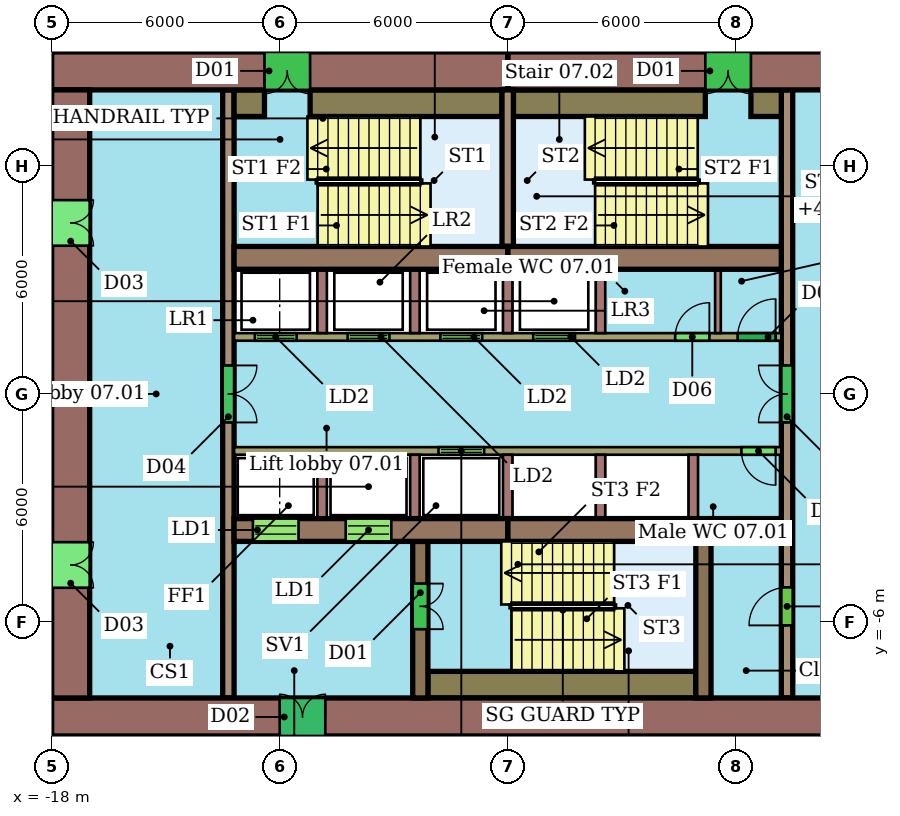
"""IFC4 building model, lengths in metres.
Left out: names, types, materials, properties, quantities, classifications, styles, units other than length and angle.
Written with IfcOpenShell. Run it as: python <this file> out.ifc"""

import sys

from ifc_helpers import new_model, si_unit, direction, frame, frame_2d, origin, place, context, subcontext, project, spatial, rectangle, extrude, element, fill, save


model = new_model("IFC4")
c1 = context("Model", 3, precision=1e-05, world=origin(), true_north=direction((0.0, 1.0)))
c2 = subcontext(c1, "Body", "Model", "MODEL_VIEW")
j1 = project(units=[si_unit("LENGTHUNIT", "METRE"), si_unit("PLANEANGLEUNIT", "RADIAN")], contexts=[c1])
p1 = place(None, origin())
s1 = spatial("IfcSite", under=j1, at=p1, CompositionType="ELEMENT")
p2 = place(p1, origin())
s2 = spatial("IfcBuilding", under=s1, at=p2, CompositionType="ELEMENT")
p3 = place(p2, frame((0.0, 0.0, 43.4)))
s3 = spatial("IfcBuildingStorey", under=s2, at=p3, CompositionType="ELEMENT", Elevation=43.4)
p4 = place(p3, frame((6.0, 8.5, 0.0), z_axis=(0.0, 0.0, 1.0), x_axis=(-1.0, 0.0, 0.0)))
e1 = element("IfcWall", 1, at=p4, inside=s3, PredefinedType="SHEAR", context=c2, shape_type="SweptSolid", body=[
    extrude(rectangle(XDim=12.0, YDim=1.0, at=frame_2d((6.0, 0.0))), origin(), (0.0, 0.0, 1.0), 3.4),
])
p5 = place(p4, frame((5.6, 0.0, 0.0)))
e2 = element("IfcOpeningElement", 2, at=p5, cuts=e1, PredefinedType="OPENING", context=c2, shape_type="SweptSolid", body=[
    extrude(rectangle(XDim=1.2, YDim=2.1, at=frame_2d((0.6, 1.05))), frame((0.0, 0.51, 0.0), z_axis=(0.0, -1.0, 0.0), x_axis=(1.0, 0.0, 0.0)), (0.0, 0.0, 1.0), 1.02),
])
p6 = place(p3, frame((-6.0, 8.5, 0.0), z_axis=(0.0, 0.0, 1.0), x_axis=(-1.0, 0.0, 0.0)))
e3 = element("IfcWall", 3, at=p6, inside=s3, PredefinedType="SHEAR", context=c2, shape_type="SweptSolid", body=[
    extrude(rectangle(XDim=12.0, YDim=1.0, at=frame_2d((6.0, 0.0))), origin(), (0.0, 0.0, 1.0), 3.4),
])
p7 = place(p6, frame((5.2, 0.0, 0.0)))
e4 = element("IfcOpeningElement", 4, at=p7, cuts=e3, PredefinedType="OPENING", context=c2, shape_type="SweptSolid", body=[
    extrude(rectangle(XDim=1.2, YDim=2.1, at=frame_2d((0.6, 1.05))), frame((0.0, 0.51, 0.0), z_axis=(0.0, -1.0, 0.0), x_axis=(1.0, 0.0, 0.0)), (0.0, 0.0, 1.0), 1.02),
])
p8 = place(p3, frame((-18.0, -8.5, 0.0), z_axis=(0.0, 0.0, 1.0), x_axis=(1.0, 0.0, 0.0)))
e5 = element("IfcWall", 5, at=p8, inside=s3, PredefinedType="SHEAR", context=c2, shape_type="SweptSolid", body=[
    extrude(rectangle(XDim=24.0, YDim=1.0, at=frame_2d((12.0, 0.0))), origin(), (0.0, 0.0, 1.0), 3.4),
])
p9 = place(p8, frame((6.0, 0.0, 0.0)))
e6 = element("IfcOpeningElement", 6, at=p9, cuts=e5, PredefinedType="OPENING", context=c2, shape_type="SweptSolid", body=[
    extrude(rectangle(XDim=1.2, YDim=2.1, at=frame_2d((0.6, 1.05))), frame((0.0, 0.51, 0.0), z_axis=(0.0, -1.0, 0.0), x_axis=(1.0, 0.0, 0.0)), (0.0, 0.0, 1.0), 1.02),
])
p10 = place(p3, frame((-17.5, 8.0, 0.0), z_axis=(0.0, 0.0, 1.0), x_axis=(0.0, -1.0, 0.0)))
e7 = element("IfcWall", 7, at=p10, inside=s3, PredefinedType="SHEAR", context=c2, shape_type="SweptSolid", body=[
    extrude(rectangle(XDim=16.0, YDim=1.0, at=frame_2d((8.0, 0.0))), origin(), (0.0, 0.0, 1.0), 3.4),
])
p11 = place(p10, frame((11.9, 0.0, 0.0)))
e8 = element("IfcOpeningElement", 8, at=p11, cuts=e7, PredefinedType="OPENING", context=c2, shape_type="SweptSolid", body=[
    extrude(rectangle(XDim=1.2, YDim=2.1, at=frame_2d((0.6, 1.05))), frame((0.0, 0.51, 0.0), z_axis=(0.0, -1.0, 0.0), x_axis=(1.0, 0.0, 0.0)), (0.0, 0.0, 1.0), 1.02),
])
p12 = place(p10, frame((2.9, 0.0, 0.0)))
e9 = element("IfcOpeningElement", 9, at=p12, cuts=e7, PredefinedType="OPENING", context=c2, shape_type="SweptSolid", body=[
    extrude(rectangle(XDim=1.2, YDim=2.1, at=frame_2d((0.6, 1.05))), frame((0.0, 0.51, 0.0), z_axis=(0.0, -1.0, 0.0), x_axis=(1.0, 0.0, 0.0)), (0.0, 0.0, 1.0), 1.02),
])
for number, where, z_axis, x_axis in (
    (10, (-13.2, 3.58, 0.0), (0.0, 0.0, 1.0), (1.0, 0.0, 0.0)),
    (11, (-6.0, 3.58, 0.0), (0.0, 0.0, 1.0), (1.0, 0.0, 0.0)),
):
    element("IfcWall", number, at=place(p3, frame(where, z_axis=z_axis, x_axis=x_axis)), inside=s3, PredefinedType="SHEAR", context=c2, shape_type="SweptSolid", body=[
        extrude(rectangle(XDim=7.2, YDim=0.6, at=frame_2d((3.6, 0.0))), origin(), (0.0, 0.0, 1.0), 3.4),
    ])
p13 = place(p3, frame((-13.2, -3.58, 0.0), z_axis=(0.0, 0.0, 1.0), x_axis=(1.0, 0.0, 0.0)))
e12 = element("IfcWall", 12, at=p13, inside=s3, PredefinedType="SHEAR", context=c2, shape_type="SweptSolid", body=[
    extrude(rectangle(XDim=7.2, YDim=0.6, at=frame_2d((3.6, 0.0))), origin(), (0.0, 0.0, 1.0), 3.4),
])
p14 = place(p13, frame((0.496, 0.0, 0.0)))
e13 = element("IfcOpeningElement", 13, at=p14, cuts=e12, PredefinedType="OPENING", context=c2, shape_type="SweptSolid", body=[
    extrude(rectangle(XDim=1.2, YDim=2.1, at=frame_2d((0.6, 1.05))), frame((0.0, 0.31, 0.0), z_axis=(0.0, -1.0, 0.0), x_axis=(1.0, 0.0, 0.0)), (0.0, 0.0, 1.0), 0.62),
])
p15 = place(p13, frame((2.938, 0.0, 0.0)))
e14 = element("IfcOpeningElement", 14, at=p15, cuts=e12, PredefinedType="OPENING", context=c2, shape_type="SweptSolid", body=[
    extrude(rectangle(XDim=1.2, YDim=2.1, at=frame_2d((0.6, 1.05))), frame((0.0, 0.31, 0.0), z_axis=(0.0, -1.0, 0.0), x_axis=(1.0, 0.0, 0.0)), (0.0, 0.0, 1.0), 0.62),
])
p16 = place(p3, frame((-6.0, -3.58, 0.0), z_axis=(0.0, 0.0, 1.0), x_axis=(1.0, 0.0, 0.0)))
e15 = element("IfcWall", 15, at=p16, inside=s3, PredefinedType="SHEAR", context=c2, shape_type="SweptSolid", body=[
    extrude(rectangle(XDim=7.2, YDim=0.6, at=frame_2d((3.6, 0.0))), origin(), (0.0, 0.0, 1.0), 3.4),
])
p17 = place(p3, frame((-13.35, 8.0, 0.0), z_axis=(0.0, 0.0, 1.0), x_axis=(0.0, -1.0, 0.0)))
e16 = element("IfcWall", 16, at=p17, inside=s3, PredefinedType="SHEAR", context=c2, shape_type="SweptSolid", body=[
    extrude(rectangle(XDim=16.0, YDim=0.3, at=frame_2d((8.0, 0.0))), origin(), (0.0, 0.0, 1.0), 3.4),
])
p18 = place(p17, frame((7.25, 0.0, 0.0)))
e17 = element("IfcOpeningElement", 17, at=p18, cuts=e16, PredefinedType="OPENING", context=c2, shape_type="SweptSolid", body=[
    extrude(rectangle(XDim=1.5, YDim=2.1, at=frame_2d((0.75, 1.05))), frame((0.0, 0.16, 0.0), z_axis=(0.0, -1.0, 0.0), x_axis=(1.0, 0.0, 0.0)), (0.0, 0.0, 1.0), 0.32),
])
p19 = place(p3, frame((1.35, -8.0, 0.0), z_axis=(0.0, 0.0, 1.0), x_axis=(0.0, 1.0, 0.0)))
e18 = element("IfcWall", 18, at=p19, inside=s3, PredefinedType="SHEAR", context=c2, shape_type="SweptSolid", body=[
    extrude(rectangle(XDim=16.0, YDim=0.3, at=frame_2d((8.0, 0.0))), origin(), (0.0, 0.0, 1.0), 3.4),
])
p20 = place(p19, frame((1.91, 0.0, 0.0)))
e19 = element("IfcOpeningElement", 19, at=p20, cuts=e18, PredefinedType="OPENING", context=c2, shape_type="SweptSolid", body=[
    extrude(rectangle(XDim=1.0, YDim=2.1, at=frame_2d((0.5, 1.05))), frame((0.0, 0.16, 0.0), z_axis=(0.0, -1.0, 0.0), x_axis=(1.0, 0.0, 0.0)), (0.0, 0.0, 1.0), 0.32),
])
p21 = place(p19, frame((7.25, 0.0, 0.0)))
e20 = element("IfcOpeningElement", 20, at=p21, cuts=e18, PredefinedType="OPENING", context=c2, shape_type="SweptSolid", body=[
    extrude(rectangle(XDim=1.5, YDim=2.1, at=frame_2d((0.75, 1.05))), frame((0.0, 0.16, 0.0), z_axis=(0.0, -1.0, 0.0), x_axis=(1.0, 0.0, 0.0)), (0.0, 0.0, 1.0), 0.32),
])
p22 = place(p3, frame((-13.2, 1.5, 0.0), z_axis=(0.0, 0.0, 1.0), x_axis=(1.0, 0.0, 0.0)))
e21 = element("IfcWall", 21, at=p22, inside=s3, PredefinedType="SHEAR", context=c2, shape_type="SweptSolid", body=[
    extrude(rectangle(XDim=14.4, YDim=0.2, at=frame_2d((7.2, 0.0))), origin(), (0.0, 0.0, 1.0), 3.4),
])
p23 = place(p22, frame((0.546, 0.0, 0.0)))
e22 = element("IfcOpeningElement", 22, at=p23, cuts=e21, PredefinedType="OPENING", context=c2, shape_type="SweptSolid", body=[
    extrude(rectangle(XDim=1.1, YDim=2.1, at=frame_2d((0.55, 1.05))), frame((0.0, 0.11, 0.0), z_axis=(0.0, -1.0, 0.0), x_axis=(1.0, 0.0, 0.0)), (0.0, 0.0, 1.0), 0.22),
])
p24 = place(p22, frame((2.988, 0.0, 0.0)))
e23 = element("IfcOpeningElement", 23, at=p24, cuts=e21, PredefinedType="OPENING", context=c2, shape_type="SweptSolid", body=[
    extrude(rectangle(XDim=1.1, YDim=2.1, at=frame_2d((0.55, 1.05))), frame((0.0, 0.11, 0.0), z_axis=(0.0, -1.0, 0.0), x_axis=(1.0, 0.0, 0.0)), (0.0, 0.0, 1.0), 0.22),
])
p25 = place(p22, frame((5.429, 0.0, 0.0)))
e24 = element("IfcOpeningElement", 24, at=p25, cuts=e21, PredefinedType="OPENING", context=c2, shape_type="SweptSolid", body=[
    extrude(rectangle(XDim=1.1, YDim=2.1, at=frame_2d((0.55, 1.05))), frame((0.0, 0.11, 0.0), z_axis=(0.0, -1.0, 0.0), x_axis=(1.0, 0.0, 0.0)), (0.0, 0.0, 1.0), 0.22),
])
p26 = place(p22, frame((7.871, 0.0, 0.0)))
e25 = element("IfcOpeningElement", 25, at=p26, cuts=e21, PredefinedType="OPENING", context=c2, shape_type="SweptSolid", body=[
    extrude(rectangle(XDim=1.1, YDim=2.1, at=frame_2d((0.55, 1.05))), frame((0.0, 0.11, 0.0), z_axis=(0.0, -1.0, 0.0), x_axis=(1.0, 0.0, 0.0)), (0.0, 0.0, 1.0), 0.22),
])
p27 = place(p22, frame((11.607, 0.0, 0.0)))
e26 = element("IfcOpeningElement", 26, at=p27, cuts=e21, PredefinedType="OPENING", context=c2, shape_type="SweptSolid", body=[
    extrude(rectangle(XDim=0.9, YDim=2.1, at=frame_2d((0.45, 1.05))), frame((0.0, 0.11, 0.0), z_axis=(0.0, -1.0, 0.0), x_axis=(1.0, 0.0, 0.0)), (0.0, 0.0, 1.0), 0.22),
])
p28 = place(p22, frame((13.25, 0.0, 0.0)))
e27 = element("IfcOpeningElement", 27, at=p28, cuts=e21, PredefinedType="OPENING", context=c2, shape_type="SweptSolid", body=[
    extrude(rectangle(XDim=1.0, YDim=2.1, at=frame_2d((0.5, 1.05))), frame((0.0, 0.11, 0.0), z_axis=(0.0, -1.0, 0.0), x_axis=(1.0, 0.0, 0.0)), (0.0, 0.0, 1.0), 0.22),
])
p29 = place(p3, frame((1.2, -1.5, 0.0), z_axis=(0.0, 0.0, 1.0), x_axis=(-1.0, 0.0, 0.0)))
e28 = element("IfcWall", 28, at=p29, inside=s3, PredefinedType="SHEAR", context=c2, shape_type="SweptSolid", body=[
    extrude(rectangle(XDim=14.4, YDim=0.2, at=frame_2d((7.2, 0.0))), origin(), (0.0, 0.0, 1.0), 3.4),
])
p30 = place(p29, frame((7.821, 0.0, 0.0)))
e29 = element("IfcOpeningElement", 29, at=p30, cuts=e28, PredefinedType="OPENING", context=c2, shape_type="SweptSolid", body=[
    extrude(rectangle(XDim=1.2, YDim=2.1, at=frame_2d((0.6, 1.05))), frame((0.0, 0.11, 0.0), z_axis=(0.0, -1.0, 0.0), x_axis=(1.0, 0.0, 0.0)), (0.0, 0.0, 1.0), 0.22),
])
p31 = place(p29, frame((0.15, 0.0, 0.0)))
e30 = element("IfcOpeningElement", 30, at=p31, cuts=e28, PredefinedType="OPENING", context=c2, shape_type="SweptSolid", body=[
    extrude(rectangle(XDim=0.9, YDim=2.1, at=frame_2d((0.45, 1.05))), frame((0.0, 0.11, 0.0), z_axis=(0.0, -1.0, 0.0), x_axis=(1.0, 0.0, 0.0)), (0.0, 0.0, 1.0), 0.22),
])
p32 = place(p3, frame((-8.3, -3.88, 0.0), z_axis=(0.0, 0.0, 1.0), x_axis=(0.0, -1.0, 0.0)))
e31 = element("IfcWall", 31, at=p32, inside=s3, PredefinedType="SHEAR", context=c2, shape_type="SweptSolid", body=[
    extrude(rectangle(XDim=4.12, YDim=0.4, at=frame_2d((2.06, 0.0))), origin(), (0.0, 0.0, 1.0), 3.4),
])
p33 = place(p32, frame((1.11, 0.0, 0.0)))
e32 = element("IfcOpeningElement", 32, at=p33, cuts=e31, PredefinedType="OPENING", context=c2, shape_type="SweptSolid", body=[
    extrude(rectangle(XDim=1.2, YDim=2.1, at=frame_2d((0.6, 1.05))), frame((0.0, 0.21, 0.0), z_axis=(0.0, -1.0, 0.0), x_axis=(1.0, 0.0, 0.0)), (0.0, 0.0, 1.0), 0.42),
])
p34 = place(p3, frame((-0.85, -3.88, 0.0), z_axis=(0.0, 0.0, 1.0), x_axis=(0.0, -1.0, 0.0)))
e33 = element("IfcWall", 33, at=p34, inside=s3, PredefinedType="SHEAR", context=c2, shape_type="SweptSolid", body=[
    extrude(rectangle(XDim=4.12, YDim=0.4, at=frame_2d((2.06, 0.0))), origin(), (0.0, 0.0, 1.0), 3.4),
])
p35 = place(p3, frame((-6.0, 3.88, 0.0), z_axis=(0.0, 0.0, 1.0), x_axis=(0.0, 1.0, 0.0)))
e34 = element("IfcWall", 34, at=p35, inside=s3, PredefinedType="SHEAR", context=c2, shape_type="SweptSolid", body=[
    extrude(rectangle(XDim=4.12, YDim=0.3, at=frame_2d((2.06, 0.0))), origin(), (0.0, 0.0, 1.0), 3.4),
])
p36 = place(p3, frame((-13.2, 7.65, 0.0), z_axis=(0.0, 0.0, 1.0), x_axis=(1.0, 0.0, 0.0)))
e35 = element("IfcWall", 35, at=p36, inside=s3, PredefinedType="SHEAR", context=c2, shape_type="SweptSolid", body=[
    extrude(rectangle(XDim=0.8, YDim=0.7, at=frame_2d((0.4, 0.0))), origin(), (0.0, 0.0, 1.0), 3.4),
])
for number, where, z_axis, x_axis in (
    (36, (-11.2, 7.65, 0.0), (0.0, 0.0, 1.0), (1.0, 0.0, 0.0)),
    (37, (-5.85, 7.65, 0.0), (0.0, 0.0, 1.0), (1.0, 0.0, 0.0)),
):
    element("IfcWall", number, at=place(p3, frame(where, z_axis=z_axis, x_axis=x_axis)), inside=s3, PredefinedType="SHEAR", context=c2, shape_type="SweptSolid", body=[
        extrude(rectangle(XDim=5.05, YDim=0.7, at=frame_2d((2.525, 0.0))), origin(), (0.0, 0.0, 1.0), 3.4),
    ])
p37 = place(p3, frame((0.4, 7.65, 0.0), z_axis=(0.0, 0.0, 1.0), x_axis=(1.0, 0.0, 0.0)))
e38 = element("IfcWall", 38, at=p37, inside=s3, PredefinedType="SHEAR", context=c2, shape_type="SweptSolid", body=[
    extrude(rectangle(XDim=0.8, YDim=0.7, at=frame_2d((0.4, 0.0))), origin(), (0.0, 0.0, 1.0), 3.4),
])
p38 = place(p3, frame((-8.1, -7.65, 0.0), z_axis=(0.0, 0.0, 1.0), x_axis=(1.0, 0.0, 0.0)))
e39 = element("IfcWall", 39, at=p38, inside=s3, PredefinedType="SHEAR", context=c2, shape_type="SweptSolid", body=[
    extrude(rectangle(XDim=7.05, YDim=0.7, at=frame_2d((3.525, 0.0))), origin(), (0.0, 0.0, 1.0), 3.4),
])
for number, where, z_axis, x_axis in (
    (40, (-10.883, 1.6, 0.0), (0.0, 0.0, 1.0), (0.0, 1.0, 0.0)),
    (41, (-8.442, 1.6, 0.0), (0.0, 0.0, 1.0), (0.0, 1.0, 0.0)),
    (42, (-6.0, 1.6, 0.0), (0.0, 0.0, 1.0), (0.0, 1.0, 0.0)),
    (43, (-3.558, 1.6, 0.0), (0.0, 0.0, 1.0), (0.0, 1.0, 0.0)),
):
    element("IfcWall", number, at=place(p3, frame(where, z_axis=z_axis, x_axis=x_axis)), inside=s3, PredefinedType="SHEAR", context=c2, shape_type="SweptSolid", body=[
        extrude(rectangle(XDim=1.68, YDim=0.25, at=frame_2d((0.84, 0.0))), origin(), (0.0, 0.0, 1.0), 3.4),
    ])
p39 = place(p3, frame((-0.468, 1.6, 0.0), z_axis=(0.0, 0.0, 1.0), x_axis=(0.0, 1.0, 0.0)))
e44 = element("IfcWall", 44, at=p39, inside=s3, PredefinedType="PARTITIONING", context=c2, shape_type="SweptSolid", body=[
    extrude(rectangle(XDim=1.68, YDim=0.15, at=frame_2d((0.84, 0.0))), origin(), (0.0, 0.0, 1.0), 3.4),
])
for number, where, z_axis, x_axis in (
    (45, (-10.883, -1.6, 0.0), (0.0, 0.0, 1.0), (0.0, -1.0, 0.0)),
    (46, (-8.442, -1.6, 0.0), (0.0, 0.0, 1.0), (0.0, -1.0, 0.0)),
    (47, (-6.0, -1.6, 0.0), (0.0, 0.0, 1.0), (0.0, -1.0, 0.0)),
    (48, (-3.558, -1.6, 0.0), (0.0, 0.0, 1.0), (0.0, -1.0, 0.0)),
    (49, (-1.117, -1.6, 0.0), (0.0, 0.0, 1.0), (0.0, -1.0, 0.0)),
):
    element("IfcWall", number, at=place(p3, frame(where, z_axis=z_axis, x_axis=x_axis)), inside=s3, PredefinedType="SHEAR", context=c2, shape_type="SweptSolid", body=[
        extrude(rectangle(XDim=1.68, YDim=0.25, at=frame_2d((0.84, 0.0))), origin(), (0.0, 0.0, 1.0), 3.4),
    ])
p40 = place(p5, origin())
e50 = element("IfcDoor", 50, at=p40, inside=s3, OperationType="DOUBLE_DOOR_SINGLE_SWING", PredefinedType="NOTDEFINED", context=c2, shape_type="SweptSolid", body=[
    extrude(rectangle(XDim=1.2, YDim=2.1, at=frame_2d((0.6, 1.05))), frame((0.0, 0.025, 0.0), z_axis=(0.0, -1.0, 0.0), x_axis=(1.0, 0.0, 0.0)), (0.0, 0.0, 1.0), 0.05),
])
fill(e2, e50)
p41 = place(p7, origin())
e51 = element("IfcDoor", 51, at=p41, inside=s3, OperationType="DOUBLE_DOOR_SINGLE_SWING", PredefinedType="NOTDEFINED", context=c2, shape_type="SweptSolid", body=[
    extrude(rectangle(XDim=1.2, YDim=2.1, at=frame_2d((0.6, 1.05))), frame((0.0, 0.025, 0.0), z_axis=(0.0, -1.0, 0.0), x_axis=(1.0, 0.0, 0.0)), (0.0, 0.0, 1.0), 0.05),
])
fill(e4, e51)
p42 = place(p9, origin())
e52 = element("IfcDoor", 52, at=p42, inside=s3, OperationType="DOUBLE_DOOR_SINGLE_SWING", PredefinedType="NOTDEFINED", context=c2, shape_type="SweptSolid", body=[
    extrude(rectangle(XDim=1.2, YDim=2.1, at=frame_2d((0.6, 1.05))), frame((0.0, 0.025, 0.0), z_axis=(0.0, -1.0, 0.0), x_axis=(1.0, 0.0, 0.0)), (0.0, 0.0, 1.0), 0.05),
])
fill(e6, e52)
p43 = place(p11, origin())
e53 = element("IfcDoor", 53, at=p43, inside=s3, OperationType="DOUBLE_DOOR_SINGLE_SWING", PredefinedType="NOTDEFINED", context=c2, shape_type="SweptSolid", body=[
    extrude(rectangle(XDim=1.2, YDim=2.1, at=frame_2d((0.6, 1.05))), frame((0.0, 0.025, 0.0), z_axis=(0.0, -1.0, 0.0), x_axis=(1.0, 0.0, 0.0)), (0.0, 0.0, 1.0), 0.05),
])
fill(e8, e53)
p44 = place(p12, origin())
e54 = element("IfcDoor", 54, at=p44, inside=s3, OperationType="DOUBLE_DOOR_SINGLE_SWING", PredefinedType="NOTDEFINED", context=c2, shape_type="SweptSolid", body=[
    extrude(rectangle(XDim=1.2, YDim=2.1, at=frame_2d((0.6, 1.05))), frame((0.0, 0.025, 0.0), z_axis=(0.0, -1.0, 0.0), x_axis=(1.0, 0.0, 0.0)), (0.0, 0.0, 1.0), 0.05),
])
fill(e9, e54)
p45 = place(p14, origin())
e55 = element("IfcDoor", 55, at=p45, inside=s3, OperationType="DOUBLE_DOOR_SLIDING", PredefinedType="NOTDEFINED", context=c2, shape_type="SweptSolid", body=[
    extrude(rectangle(XDim=1.2, YDim=2.1, at=frame_2d((0.6, 1.05))), frame((0.0, 0.025, 0.0), z_axis=(0.0, -1.0, 0.0), x_axis=(1.0, 0.0, 0.0)), (0.0, 0.0, 1.0), 0.05),
])
fill(e13, e55)
p46 = place(p15, origin())
e56 = element("IfcDoor", 56, at=p46, inside=s3, OperationType="DOUBLE_DOOR_SLIDING", PredefinedType="NOTDEFINED", context=c2, shape_type="SweptSolid", body=[
    extrude(rectangle(XDim=1.2, YDim=2.1, at=frame_2d((0.6, 1.05))), frame((0.0, 0.025, 0.0), z_axis=(0.0, -1.0, 0.0), x_axis=(1.0, 0.0, 0.0)), (0.0, 0.0, 1.0), 0.05),
])
fill(e14, e56)
p47 = place(p18, origin())
e57 = element("IfcDoor", 57, at=p47, inside=s3, OperationType="DOUBLE_DOOR_SINGLE_SWING", PredefinedType="NOTDEFINED", context=c2, shape_type="SweptSolid", body=[
    extrude(rectangle(XDim=1.5, YDim=2.1, at=frame_2d((0.75, 1.05))), frame((0.0, 0.025, 0.0), z_axis=(0.0, -1.0, 0.0), x_axis=(1.0, 0.0, 0.0)), (0.0, 0.0, 1.0), 0.05),
])
fill(e17, e57)
p48 = place(p20, origin())
e58 = element("IfcDoor", 58, at=p48, inside=s3, OperationType="SINGLE_SWING_LEFT", PredefinedType="NOTDEFINED", context=c2, shape_type="SweptSolid", body=[
    extrude(rectangle(XDim=1.0, YDim=2.1, at=frame_2d((0.5, 1.05))), frame((0.0, 0.025, 0.0), z_axis=(0.0, -1.0, 0.0), x_axis=(1.0, 0.0, 0.0)), (0.0, 0.0, 1.0), 0.05),
])
fill(e19, e58)
p49 = place(p21, origin())
e59 = element("IfcDoor", 59, at=p49, inside=s3, OperationType="DOUBLE_DOOR_SINGLE_SWING", PredefinedType="NOTDEFINED", context=c2, shape_type="SweptSolid", body=[
    extrude(rectangle(XDim=1.5, YDim=2.1, at=frame_2d((0.75, 1.05))), frame((0.0, 0.025, 0.0), z_axis=(0.0, -1.0, 0.0), x_axis=(1.0, 0.0, 0.0)), (0.0, 0.0, 1.0), 0.05),
])
fill(e20, e59)
p50 = place(p23, origin())
e60 = element("IfcDoor", 60, at=p50, inside=s3, OperationType="DOUBLE_DOOR_SLIDING", PredefinedType="NOTDEFINED", context=c2, shape_type="SweptSolid", body=[
    extrude(rectangle(XDim=1.1, YDim=2.1, at=frame_2d((0.55, 1.05))), frame((0.0, 0.025, 0.0), z_axis=(0.0, -1.0, 0.0), x_axis=(1.0, 0.0, 0.0)), (0.0, 0.0, 1.0), 0.05),
])
fill(e22, e60)
p51 = place(p24, origin())
e61 = element("IfcDoor", 61, at=p51, inside=s3, OperationType="DOUBLE_DOOR_SLIDING", PredefinedType="NOTDEFINED", context=c2, shape_type="SweptSolid", body=[
    extrude(rectangle(XDim=1.1, YDim=2.1, at=frame_2d((0.55, 1.05))), frame((0.0, 0.025, 0.0), z_axis=(0.0, -1.0, 0.0), x_axis=(1.0, 0.0, 0.0)), (0.0, 0.0, 1.0), 0.05),
])
fill(e23, e61)
p52 = place(p25, origin())
e62 = element("IfcDoor", 62, at=p52, inside=s3, OperationType="DOUBLE_DOOR_SLIDING", PredefinedType="NOTDEFINED", context=c2, shape_type="SweptSolid", body=[
    extrude(rectangle(XDim=1.1, YDim=2.1, at=frame_2d((0.55, 1.05))), frame((0.0, 0.025, 0.0), z_axis=(0.0, -1.0, 0.0), x_axis=(1.0, 0.0, 0.0)), (0.0, 0.0, 1.0), 0.05),
])
fill(e24, e62)
p53 = place(p26, origin())
e63 = element("IfcDoor", 63, at=p53, inside=s3, OperationType="DOUBLE_DOOR_SLIDING", PredefinedType="NOTDEFINED", context=c2, shape_type="SweptSolid", body=[
    extrude(rectangle(XDim=1.1, YDim=2.1, at=frame_2d((0.55, 1.05))), frame((0.0, 0.025, 0.0), z_axis=(0.0, -1.0, 0.0), x_axis=(1.0, 0.0, 0.0)), (0.0, 0.0, 1.0), 0.05),
])
fill(e25, e63)
p54 = place(p27, origin())
e64 = element("IfcDoor", 64, at=p54, inside=s3, OperationType="SINGLE_SWING_RIGHT", PredefinedType="NOTDEFINED", context=c2, shape_type="SweptSolid", body=[
    extrude(rectangle(XDim=0.9, YDim=2.1, at=frame_2d((0.45, 1.05))), frame((0.0, 0.025, 0.0), z_axis=(0.0, -1.0, 0.0), x_axis=(1.0, 0.0, 0.0)), (0.0, 0.0, 1.0), 0.05),
])
fill(e26, e64)
p55 = place(p28, origin())
e65 = element("IfcDoor", 65, at=p55, inside=s3, OperationType="SINGLE_SWING_RIGHT", PredefinedType="NOTDEFINED", context=c2, shape_type="SweptSolid", body=[
    extrude(rectangle(XDim=1.0, YDim=2.1, at=frame_2d((0.5, 1.05))), frame((0.0, 0.025, 0.0), z_axis=(0.0, -1.0, 0.0), x_axis=(1.0, 0.0, 0.0)), (0.0, 0.0, 1.0), 0.05),
])
fill(e27, e65)
p56 = place(p30, origin())
e66 = element("IfcDoor", 66, at=p56, inside=s3, OperationType="DOUBLE_DOOR_SLIDING", PredefinedType="NOTDEFINED", context=c2, shape_type="SweptSolid", body=[
    extrude(rectangle(XDim=1.2, YDim=2.1, at=frame_2d((0.6, 1.05))), frame((0.0, 0.025, 0.0), z_axis=(0.0, -1.0, 0.0), x_axis=(1.0, 0.0, 0.0)), (0.0, 0.0, 1.0), 0.05),
])
fill(e29, e66)
p57 = place(p31, origin())
e67 = element("IfcDoor", 67, at=p57, inside=s3, OperationType="SINGLE_SWING_LEFT", PredefinedType="NOTDEFINED", context=c2, shape_type="SweptSolid", body=[
    extrude(rectangle(XDim=0.9, YDim=2.1, at=frame_2d((0.45, 1.05))), frame((0.0, 0.025, 0.0), z_axis=(0.0, -1.0, 0.0), x_axis=(1.0, 0.0, 0.0)), (0.0, 0.0, 1.0), 0.05),
])
fill(e30, e67)
p58 = place(p33, origin())
e68 = element("IfcDoor", 68, at=p58, inside=s3, OperationType="DOUBLE_DOOR_SINGLE_SWING", PredefinedType="NOTDEFINED", context=c2, shape_type="SweptSolid", body=[
    extrude(rectangle(XDim=1.2, YDim=2.1, at=frame_2d((0.6, 1.05))), frame((0.0, 0.025, 0.0), z_axis=(0.0, -1.0, 0.0), x_axis=(1.0, 0.0, 0.0)), (0.0, 0.0, 1.0), 0.05),
])
fill(e32, e68)
save(model, sys.argv[1])
